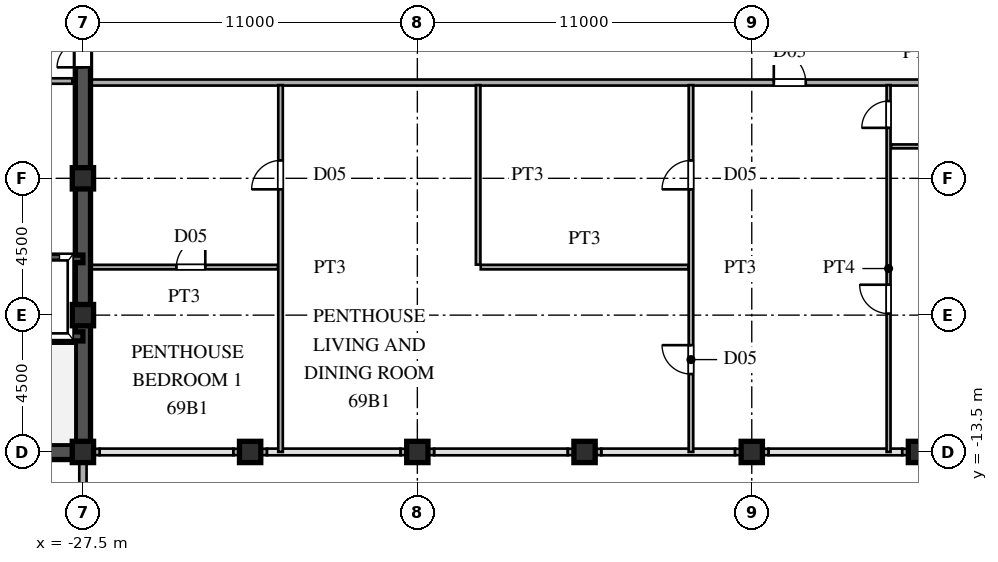
"""IFC4 building model, lengths in metres.
Left out: names, types, materials, properties, quantities, classifications, styles, units other than length and angle.
Written with IfcOpenShell. Run it as: python <this file> out.ifc"""

import sys

from ifc_helpers import new_model, si_unit, direction, frame, frame_2d, origin, origin_2d, place, context, subcontext, project, spatial, rectangle, hollow_rectangle, extrude, source, transform, mapped, element, fill, save


model = new_model("IFC4")
c1 = context("Model", 3, precision=1e-05, world=origin(), true_north=direction((0.0, 1.0)))
c2 = subcontext(c1, "Body", "Model", "MODEL_VIEW")
j1 = project(units=[si_unit("LENGTHUNIT", "METRE"), si_unit("PLANEANGLEUNIT", "RADIAN")], contexts=[c1])
p1 = place(None, origin())
s1 = spatial("IfcSite", under=j1, at=p1, CompositionType="ELEMENT")
p2 = place(p1, origin())
s2 = spatial("IfcBuilding", under=s1, at=p2, CompositionType="ELEMENT")
p3 = place(p2, frame((0.0, 0.0, 261.9)))
s3 = spatial("IfcBuildingStorey", under=s2, at=p3, CompositionType="ELEMENT", Elevation=261.9)
m1 = source(origin(), c2, "Body", "SweptSolid", [
    extrude(hollow_rectangle(XDim=0.7, YDim=0.7, WallThickness=0.03, at=origin_2d()), origin(), (0.0, 0.0, 1.0), 3.75),
])
for number, where, z_axis, x_axis in (
    (1, (-27.5, -13.5, 0.0), (0.0, 0.0, 1.0), (1.0, 0.0, 0.0)),
    (2, (-27.5, -9.0, 0.0), (0.0, 0.0, 1.0), (1.0, 0.0, 0.0)),
    (3, (-27.5, -4.5, 0.0), (0.0, 0.0, 1.0), (1.0, 0.0, 0.0)),
    (4, (-22.0, -13.5, 0.0), (0.0, 0.0, 1.0), (1.0, 0.0, 0.0)),
    (5, (-16.5, -13.5, 0.0), (0.0, 0.0, 1.0), (1.0, 0.0, 0.0)),
    (6, (-11.0, -13.5, 0.0), (0.0, 0.0, 1.0), (1.0, 0.0, 0.0)),
    (7, (-5.5, -13.5, 0.0), (0.0, 0.0, 1.0), (1.0, 0.0, 0.0)),
    (8, (0.0, -13.5, 0.0), (0.0, 0.0, 1.0), (1.0, 0.0, 0.0)),
):
    element("IfcColumn", number, at=place(p3, frame(where, z_axis=z_axis, x_axis=x_axis)), inside=s3, PredefinedType="COLUMN", context=c2, shape_type="MappedRepresentation", body=[
        mapped(m1, transform((0.0, 0.0, 0.0), scale=1.0)),
    ])
p4 = place(p3, frame((-27.5, -15.98, 0.0), z_axis=(0.0, 0.0, 1.0), x_axis=(0.0, 1.0, 0.0)))
e9 = element("IfcWall", 9, at=p4, inside=s3, PredefinedType="SOLIDWALL", context=c2, shape_type="SweptSolid", body=[
    extrude(rectangle(XDim=1.605, YDim=0.24, at=frame_2d((0.803, 0.0))), origin(), (0.0, 0.0, 1.0), 3.53),
])
p5 = place(p3, frame((-27.5, -14.375, 0.0), z_axis=(0.0, 0.0, 1.0), x_axis=(0.0, 1.0, 0.0)))
e10 = element("IfcWall", 10, at=p5, inside=s3, PredefinedType="SOLIDWALL", context=c2, shape_type="SweptSolid", body=[
    extrude(rectangle(XDim=0.62, YDim=0.24, at=frame_2d((0.31, 0.0))), origin(), (0.0, 0.0, 1.0), 3.03),
])
p6 = place(p3, frame((-27.49, -13.5, 0.0), z_axis=(0.0, 0.0, 1.0), x_axis=(1.0, 0.0, 0.0)))
e11 = element("IfcWall", 11, at=p6, inside=s3, PredefinedType="SOLIDWALL", context=c2, shape_type="SweptSolid", body=[
    extrude(rectangle(XDim=0.54, YDim=0.21, at=frame_2d((0.27, 0.0))), origin(), (0.0, 0.0, 1.0), 3.03),
])
for number, where, z_axis, x_axis in (
    (12, (-22.55, -13.5, 0.0), (0.0, 0.0, 1.0), (1.0, 0.0, 0.0)),
    (13, (-17.05, -13.5, 0.0), (0.0, 0.0, 1.0), (1.0, 0.0, 0.0)),
    (14, (-11.55, -13.5, 0.0), (0.0, 0.0, 1.0), (1.0, 0.0, 0.0)),
    (15, (-6.05, -13.5, 0.0), (0.0, 0.0, 1.0), (1.0, 0.0, 0.0)),
    (16, (-0.55, -13.5, 0.0), (0.0, 0.0, 1.0), (1.0, 0.0, 0.0)),
):
    element("IfcWall", number, at=place(p3, frame(where, z_axis=z_axis, x_axis=x_axis)), inside=s3, PredefinedType="SOLIDWALL", context=c2, shape_type="SweptSolid", body=[
        extrude(rectangle(XDim=1.1, YDim=0.21, at=frame_2d((0.55, 0.0))), origin(), (0.0, 0.0, 1.0), 3.03),
    ])
p7 = place(p3, frame((-27.5, -13.5, 0.0), z_axis=(0.0, 0.0, 1.0), x_axis=(0.0, 1.0, 0.0)))
e17 = element("IfcWall", 17, at=p7, inside=s3, PredefinedType="SHEAR", context=c2, shape_type="SweptSolid", body=[
    extrude(rectangle(XDim=12.2, YDim=0.5, at=frame_2d((6.1, 0.0))), origin(), (0.0, 0.0, 1.0), 3.53),
])
p8 = place(p3, frame((-27.5, -1.3, 0.0), z_axis=(0.0, 0.0, 1.0), x_axis=(0.0, 1.0, 0.0)))
e18 = element("IfcWall", 18, at=p8, inside=s3, PredefinedType="SHEAR", context=c2, shape_type="SweptSolid", body=[
    extrude(rectangle(XDim=2.6, YDim=0.5, at=frame_2d((1.3, 0.0))), origin(), (0.0, 0.0, 1.0), 3.53),
])
p9 = place(p8, frame((0.45, 0.0, 0.0)))
e19 = element("IfcOpeningElement", 19, at=p9, cuts=e18, PredefinedType="OPENING", context=c2, shape_type="SweptSolid", body=[
    extrude(rectangle(XDim=1.7, YDim=2.35, at=frame_2d((0.85, 1.175))), frame((0.0, 0.26, 0.0), z_axis=(0.0, -1.0, 0.0), x_axis=(1.0, 0.0, 0.0)), (0.0, 0.0, 1.0), 0.52),
])
p10 = place(p3, frame((-36.5, -13.5, 0.0), z_axis=(0.0, 0.0, 1.0), x_axis=(1.0, 0.0, 0.0)))
e20 = element("IfcWall", 20, at=p10, inside=s3, PredefinedType="SHEAR", context=c2, shape_type="SweptSolid", body=[
    extrude(rectangle(XDim=9.0, YDim=0.5, at=frame_2d((4.5, 0.0))), origin(), (0.0, 0.0, 1.0), 3.53),
])
p11 = place(p3, frame((-36.5, -9.7, 0.0), z_axis=(0.0, 0.0, 1.0), x_axis=(1.0, 0.0, 0.0)))
e21 = element("IfcWall", 21, at=p11, inside=s3, PredefinedType="SHEAR", context=c2, shape_type="SweptSolid", body=[
    extrude(rectangle(XDim=9.0, YDim=0.3, at=frame_2d((4.5, 0.0))), origin(), (0.0, 0.0, 1.0), 3.53),
])
p12 = place(p11, frame((0.6, 0.0, 0.0)))
e22 = element("IfcOpeningElement", 22, at=p12, cuts=e21, PredefinedType="OPENING", context=c2, shape_type="SweptSolid", body=[
    extrude(rectangle(XDim=1.1, YDim=2.2, at=frame_2d((0.55, 1.1))), frame((0.0, 0.16, 0.0), z_axis=(0.0, -1.0, 0.0), x_axis=(1.0, 0.0, 0.0)), (0.0, 0.0, 1.0), 0.32),
])
p13 = place(p3, frame((-30.3, -7.15, 0.0), z_axis=(0.0, 0.0, 1.0), x_axis=(1.0, 0.0, 0.0)))
e23 = element("IfcWall", 23, at=p13, inside=s3, PredefinedType="SHEAR", context=c2, shape_type="SweptSolid", body=[
    extrude(rectangle(XDim=2.8, YDim=0.25, at=frame_2d((1.4, 0.0))), origin(), (0.0, 0.0, 1.0), 3.53),
])
p14 = place(p3, frame((-33.02, -1.3, 0.0), z_axis=(0.0, 0.0, 1.0), x_axis=(1.0, 0.0, 0.0)))
e24 = element("IfcWall", 24, at=p14, inside=s3, PredefinedType="PARTITIONING", context=c2, shape_type="SweptSolid", body=[
    extrude(rectangle(XDim=5.17, YDim=0.18, at=frame_2d((2.585, 0.0))), origin(), (0.0, 0.0, 1.0), 3.53),
])
p15 = place(p14, frame((2.01, 0.0, 0.0)))
e25 = element("IfcOpeningElement", 25, at=p15, cuts=e24, PredefinedType="OPENING", context=c2, shape_type="SweptSolid", body=[
    extrude(rectangle(XDim=1.15, YDim=2.2, at=frame_2d((0.575, 1.1))), frame((0.0, 0.1, 0.0), z_axis=(0.0, -1.0, 0.0), x_axis=(1.0, 0.0, 0.0)), (0.0, 0.0, 1.0), 0.2),
])
p16 = place(p3, frame((-27.245, -7.42, 0.0), z_axis=(0.0, 0.0, 1.0), x_axis=(1.0, 0.0, 0.0)))
e26 = element("IfcWall", 26, at=p16, inside=s3, PredefinedType="PARTITIONING", context=c2, shape_type="SweptSolid", body=[
    extrude(rectangle(XDim=6.16, YDim=0.15, at=frame_2d((3.08, 0.0))), origin(), (0.0, 0.0, 1.0), 3.53),
])
p17 = place(p16, frame((2.82, 0.0, 0.0)))
e27 = element("IfcOpeningElement", 27, at=p17, cuts=e26, PredefinedType="OPENING", context=c2, shape_type="SweptSolid", body=[
    extrude(rectangle(XDim=0.95, YDim=2.15, at=frame_2d((0.475, 1.075))), frame((0.0, 0.085, 0.0), z_axis=(0.0, -1.0, 0.0), x_axis=(1.0, 0.0, 0.0)), (0.0, 0.0, 1.0), 0.17),
])
p18 = place(p3, frame((-14.415, -7.42, 0.0), z_axis=(0.0, 0.0, 1.0), x_axis=(1.0, 0.0, 0.0)))
e28 = element("IfcWall", 28, at=p18, inside=s3, PredefinedType="PARTITIONING", context=c2, shape_type="SweptSolid", body=[
    extrude(rectangle(XDim=6.83, YDim=0.15, at=frame_2d((3.415, 0.0))), origin(), (0.0, 0.0, 1.0), 3.53),
])
p19 = place(p3, frame((-0.915, -3.45, 0.0), z_axis=(0.0, 0.0, 1.0), x_axis=(1.0, 0.0, 0.0)))
e29 = element("IfcWall", 29, at=p19, inside=s3, PredefinedType="PARTITIONING", context=c2, shape_type="SweptSolid", body=[
    extrude(rectangle(XDim=5.33, YDim=0.13, at=frame_2d((2.665, 0.0))), origin(), (0.0, 0.0, 1.0), 3.53),
])
p20 = place(p3, frame((-27.245, -1.35, 0.0), z_axis=(0.0, 0.0, 1.0), x_axis=(1.0, 0.0, 0.0)))
e30 = element("IfcWall", 30, at=p20, inside=s3, PredefinedType="PARTITIONING", context=c2, shape_type="SweptSolid", body=[
    extrude(rectangle(XDim=54.49, YDim=0.2, at=frame_2d((27.245, 0.0))), origin(), (0.0, 0.0, 1.0), 3.53),
])
p21 = place(p20, frame((22.47, 0.0, 0.0)))
e31 = element("IfcOpeningElement", 31, at=p21, cuts=e30, PredefinedType="OPENING", context=c2, shape_type="SweptSolid", body=[
    extrude(rectangle(XDim=1.05, YDim=2.25, at=frame_2d((0.525, 1.125))), frame((0.0, 0.11, 0.0), z_axis=(0.0, -1.0, 0.0), x_axis=(1.0, 0.0, 0.0)), (0.0, 0.0, 1.0), 0.22),
])
p22 = place(p3, frame((-21.0, -13.5, 0.0), z_axis=(0.0, 0.0, 1.0), x_axis=(0.0, 1.0, 0.0)))
e32 = element("IfcWall", 32, at=p22, inside=s3, PredefinedType="PARTITIONING", context=c2, shape_type="SweptSolid", body=[
    extrude(rectangle(XDim=12.065, YDim=0.15, at=frame_2d((6.032, 0.0))), origin(), (0.0, 0.0, 1.0), 3.53),
])
p23 = place(p22, frame((8.637, 0.0, 0.0)))
e33 = element("IfcOpeningElement", 33, at=p23, cuts=e32, PredefinedType="OPENING", context=c2, shape_type="SweptSolid", body=[
    extrude(rectangle(XDim=0.95, YDim=2.15, at=frame_2d((0.475, 1.075))), frame((0.0, 0.085, 0.0), z_axis=(0.0, -1.0, 0.0), x_axis=(1.0, 0.0, 0.0)), (0.0, 0.0, 1.0), 0.17),
])
p24 = place(p3, frame((-14.5, -7.34, 0.0), z_axis=(0.0, 0.0, 1.0), x_axis=(0.0, 1.0, 0.0)))
e34 = element("IfcWall", 34, at=p24, inside=s3, PredefinedType="PARTITIONING", context=c2, shape_type="SweptSolid", body=[
    extrude(rectangle(XDim=5.905, YDim=0.15, at=frame_2d((2.953, 0.0))), origin(), (0.0, 0.0, 1.0), 3.53),
])
p25 = place(p3, frame((-7.5, -13.5, 0.0), z_axis=(0.0, 0.0, 1.0), x_axis=(0.0, 1.0, 0.0)))
e35 = element("IfcWall", 35, at=p25, inside=s3, PredefinedType="PARTITIONING", context=c2, shape_type="SweptSolid", body=[
    extrude(rectangle(XDim=12.065, YDim=0.15, at=frame_2d((6.032, 0.0))), origin(), (0.0, 0.0, 1.0), 3.53),
])
p26 = place(p25, frame((8.637, 0.0, 0.0)))
e36 = element("IfcOpeningElement", 36, at=p26, cuts=e35, PredefinedType="OPENING", context=c2, shape_type="SweptSolid", body=[
    extrude(rectangle(XDim=0.95, YDim=2.15, at=frame_2d((0.475, 1.075))), frame((0.0, 0.085, 0.0), z_axis=(0.0, -1.0, 0.0), x_axis=(1.0, 0.0, 0.0)), (0.0, 0.0, 1.0), 0.17),
])
p27 = place(p25, frame((2.562, 0.0, 0.0)))
e37 = element("IfcOpeningElement", 37, at=p27, cuts=e35, PredefinedType="OPENING", context=c2, shape_type="SweptSolid", body=[
    extrude(rectangle(XDim=0.95, YDim=2.15, at=frame_2d((0.475, 1.075))), frame((0.0, 0.085, 0.0), z_axis=(0.0, -1.0, 0.0), x_axis=(1.0, 0.0, 0.0)), (0.0, 0.0, 1.0), 0.17),
])
p28 = place(p3, frame((-1.0, -13.5, 0.0), z_axis=(0.0, 0.0, 1.0), x_axis=(0.0, 1.0, 0.0)))
e38 = element("IfcWall", 38, at=p28, inside=s3, PredefinedType="PARTITIONING", context=c2, shape_type="SweptSolid", body=[
    extrude(rectangle(XDim=12.065, YDim=0.13, at=frame_2d((6.032, 0.0))), origin(), (0.0, 0.0, 1.0), 3.53),
])
p29 = place(p28, frame((10.66, 0.0, 0.0)))
e39 = element("IfcOpeningElement", 39, at=p29, cuts=e38, PredefinedType="OPENING", context=c2, shape_type="SweptSolid", body=[
    extrude(rectangle(XDim=0.88, YDim=2.1, at=frame_2d((0.44, 1.05))), frame((0.0, 0.075, 0.0), z_axis=(0.0, -1.0, 0.0), x_axis=(1.0, 0.0, 0.0)), (0.0, 0.0, 1.0), 0.15),
])
p30 = place(p28, frame((4.55, 0.0, 0.0)))
e40 = element("IfcOpeningElement", 40, at=p30, cuts=e38, PredefinedType="OPENING", context=c2, shape_type="SweptSolid", body=[
    extrude(rectangle(XDim=0.95, YDim=2.15, at=frame_2d((0.475, 1.075))), frame((0.0, 0.075, 0.0), z_axis=(0.0, -1.0, 0.0), x_axis=(1.0, 0.0, 0.0)), (0.0, 0.0, 1.0), 0.15),
])
m2 = source(origin(), c2, "Body", "SweptSolid", [
    extrude(rectangle(XDim=1.7, YDim=2.35, at=frame_2d((0.85, 1.175))), frame((0.0, 0.025, 0.0), z_axis=(0.0, -1.0, 0.0), x_axis=(1.0, 0.0, 0.0)), (0.0, 0.0, 1.0), 0.05),
])
p31 = place(p9, origin())
e41 = element("IfcDoor", 41, at=p31, inside=s3, OperationType="DOUBLE_SWING_LEFT", PredefinedType="DOOR", context=c2, shape_type="MappedRepresentation", body=[
    mapped(m2, transform((0.0, 0.0, 0.0), scale=1.0)),
])
fill(e19, e41)
m3 = source(origin(), c2, "Body", "SweptSolid", [
    extrude(rectangle(XDim=0.95, YDim=2.15, at=frame_2d((0.475, 1.075))), frame((0.0, 0.025, 0.0), z_axis=(0.0, -1.0, 0.0), x_axis=(1.0, 0.0, 0.0)), (0.0, 0.0, 1.0), 0.05),
])
p32 = place(p17, origin())
e42 = element("IfcDoor", 42, at=p32, inside=s3, OperationType="SINGLE_SWING_RIGHT", PredefinedType="DOOR", context=c2, shape_type="MappedRepresentation", body=[
    mapped(m3, transform((0.0, 0.0, 0.0), scale=1.0)),
])
fill(e27, e42)
m4 = source(origin(), c2, "Body", "SweptSolid", [
    extrude(rectangle(XDim=1.05, YDim=2.25, at=frame_2d((0.525, 1.125))), frame((0.0, 0.025, 0.0), z_axis=(0.0, -1.0, 0.0), x_axis=(1.0, 0.0, 0.0)), (0.0, 0.0, 1.0), 0.05),
])
p33 = place(p21, origin())
e43 = element("IfcDoor", 43, at=p33, inside=s3, OperationType="SINGLE_SWING_LEFT", PredefinedType="DOOR", context=c2, shape_type="MappedRepresentation", body=[
    mapped(m4, transform((0.0, 0.0, 0.0), scale=1.0)),
])
fill(e31, e43)
p34 = place(p23, origin())
e44 = element("IfcDoor", 44, at=p34, inside=s3, OperationType="SINGLE_SWING_LEFT", PredefinedType="DOOR", context=c2, shape_type="MappedRepresentation", body=[
    mapped(m3, transform((0.0, 0.0, 0.0), scale=1.0)),
])
fill(e33, e44)
p35 = place(p26, origin())
e45 = element("IfcDoor", 45, at=p35, inside=s3, OperationType="SINGLE_SWING_LEFT", PredefinedType="DOOR", context=c2, shape_type="MappedRepresentation", body=[
    mapped(m3, transform((0.0, 0.0, 0.0), scale=1.0)),
])
fill(e36, e45)
p36 = place(p27, origin())
e46 = element("IfcDoor", 46, at=p36, inside=s3, OperationType="SINGLE_SWING_RIGHT", PredefinedType="DOOR", context=c2, shape_type="MappedRepresentation", body=[
    mapped(m3, transform((0.0, 0.0, 0.0), scale=1.0)),
])
fill(e37, e46)
m5 = source(origin(), c2, "Body", "SweptSolid", [
    extrude(rectangle(XDim=0.88, YDim=2.1, at=frame_2d((0.44, 1.05))), frame((0.0, 0.025, 0.0), z_axis=(0.0, -1.0, 0.0), x_axis=(1.0, 0.0, 0.0)), (0.0, 0.0, 1.0), 0.05),
])
p37 = place(p29, origin())
e47 = element("IfcDoor", 47, at=p37, inside=s3, OperationType="SINGLE_SWING_LEFT", PredefinedType="DOOR", context=c2, shape_type="MappedRepresentation", body=[
    mapped(m5, transform((0.0, 0.0, 0.0), scale=1.0)),
])
fill(e39, e47)
p38 = place(p30, origin())
e48 = element("IfcDoor", 48, at=p38, inside=s3, OperationType="SINGLE_SWING_RIGHT", PredefinedType="DOOR", context=c2, shape_type="MappedRepresentation", body=[
    mapped(m3, transform((0.0, 0.0, 0.0), scale=1.0)),
])
fill(e40, e48)
save(model, sys.argv[1])
